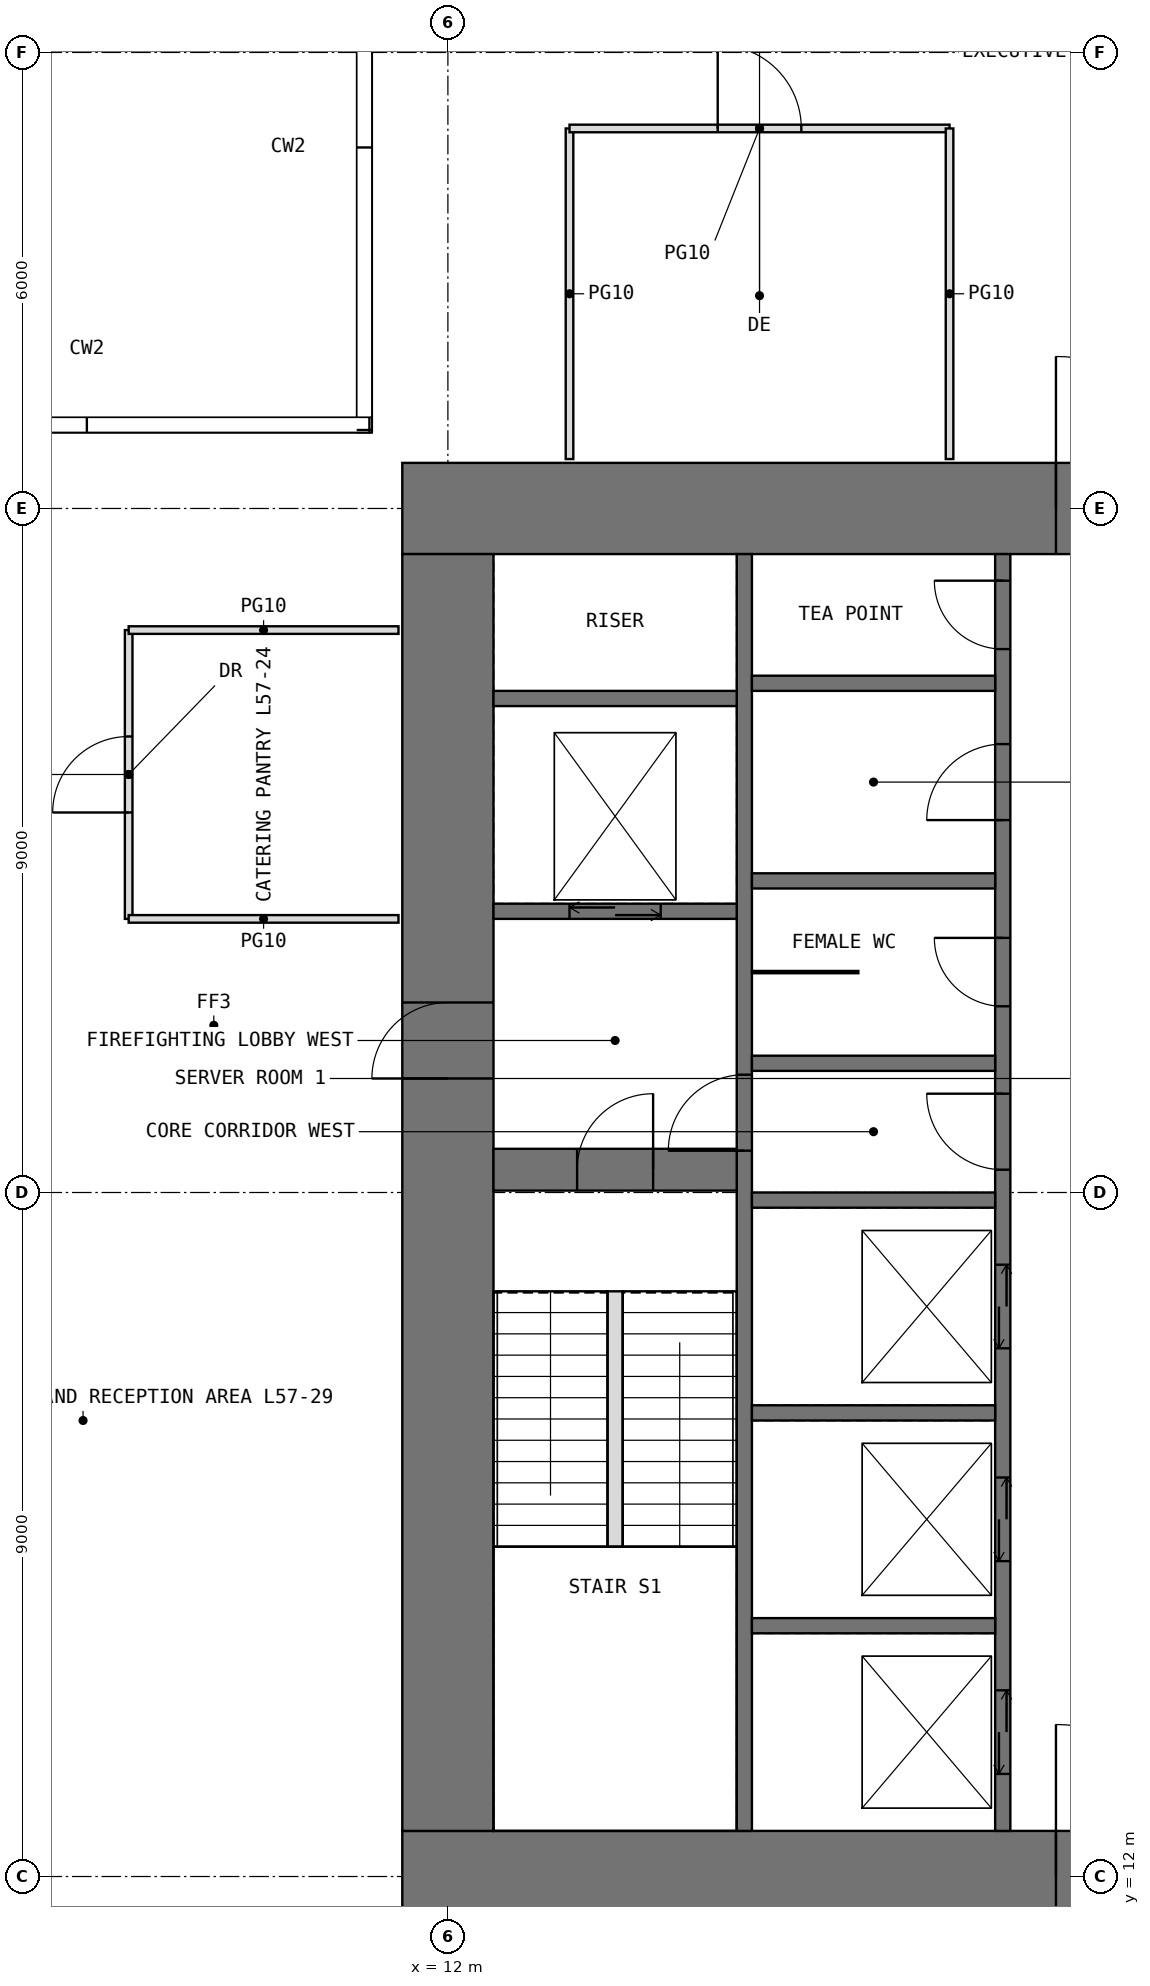
"""IFC4 building model, lengths in metres.
Left out: names, types, materials, properties, quantities, classifications, styles, units other than length and angle.
Written with IfcOpenShell. Run it as: python <this file> out.ifc"""

import sys

from ifc_helpers import new_model, si_unit, direction, frame, frame_2d, origin, place, context, subcontext, project, spatial, rectangle, extrude, element, fill, save


model = new_model("IFC4")
c1 = context("Model", 3, precision=1e-05, world=origin(), true_north=direction((0.0, 1.0)))
c2 = subcontext(c1, "Body", "Model", "MODEL_VIEW")
j1 = project(units=[si_unit("LENGTHUNIT", "METRE"), si_unit("PLANEANGLEUNIT", "RADIAN")], contexts=[c1])
p1 = place(None, origin())
s1 = spatial("IfcSite", under=j1, at=p1, CompositionType="ELEMENT")
p2 = place(p1, origin())
s2 = spatial("IfcBuilding", under=s1, at=p2, CompositionType="ELEMENT")
p3 = place(p2, frame((0.0, 0.0, 239.5)))
s3 = spatial("IfcBuildingStorey", under=s2, at=p3, CompositionType="ELEMENT", Elevation=239.5)
p4 = place(p3, frame((11.4, 12.0, -0.05), z_axis=(0.0, 0.0, 1.0), x_axis=(1.0, 0.0, 0.0)))
e1 = element("IfcWall", 1, at=p4, inside=s3, PredefinedType="SHEAR", context=c2, shape_type="SweptSolid", body=[
    extrude(rectangle(XDim=19.2, YDim=1.2, at=frame_2d((9.6, 0.0))), origin(), (0.0, 0.0, 1.0), 4.5),
])
p5 = place(p4, frame((8.6, 0.0, 0.05)))
e2 = element("IfcOpeningElement", 2, at=p5, cuts=e1, PredefinedType="OPENING", context=c2, shape_type="SweptSolid", body=[
    extrude(rectangle(XDim=2.0, YDim=2.2, at=frame_2d((1.0, 1.1))), frame((0.0, 0.61, 0.0), z_axis=(0.0, -1.0, 0.0), x_axis=(1.0, 0.0, 0.0)), (0.0, 0.0, 1.0), 1.22),
])
p6 = place(p3, frame((11.4, 30.0, -0.05), z_axis=(0.0, 0.0, 1.0), x_axis=(1.0, 0.0, 0.0)))
e3 = element("IfcWall", 3, at=p6, inside=s3, PredefinedType="SHEAR", context=c2, shape_type="SweptSolid", body=[
    extrude(rectangle(XDim=19.2, YDim=1.2, at=frame_2d((9.6, 0.0))), origin(), (0.0, 0.0, 1.0), 4.5),
])
p7 = place(p6, frame((8.6, 0.0, 0.05)))
e4 = element("IfcOpeningElement", 4, at=p7, cuts=e3, PredefinedType="OPENING", context=c2, shape_type="SweptSolid", body=[
    extrude(rectangle(XDim=2.0, YDim=2.2, at=frame_2d((1.0, 1.1))), frame((0.0, 0.61, 0.0), z_axis=(0.0, -1.0, 0.0), x_axis=(1.0, 0.0, 0.0)), (0.0, 0.0, 1.0), 1.22),
])
p8 = place(p3, frame((12.0, 12.6, -0.05), z_axis=(0.0, 0.0, 1.0), x_axis=(0.0, 1.0, 0.0)))
e5 = element("IfcWall", 5, at=p8, inside=s3, PredefinedType="SHEAR", context=c2, shape_type="SweptSolid", body=[
    extrude(rectangle(XDim=16.8, YDim=1.2, at=frame_2d((8.4, 0.0))), origin(), (0.0, 0.0, 1.0), 4.5),
])
p9 = place(p8, frame((9.9, 0.0, 0.05)))
e6 = element("IfcOpeningElement", 6, at=p9, cuts=e5, PredefinedType="OPENING", context=c2, shape_type="SweptSolid", body=[
    extrude(rectangle(XDim=1.0, YDim=2.2, at=frame_2d((0.5, 1.1))), frame((0.0, 0.61, 0.0), z_axis=(0.0, -1.0, 0.0), x_axis=(1.0, 0.0, 0.0)), (0.0, 0.0, 1.0), 1.22),
])
p10 = place(p3, frame((15.9, 12.6, -0.05), z_axis=(0.0, 0.0, 1.0), x_axis=(0.0, 1.0, 0.0)))
e7 = element("IfcWall", 7, at=p10, inside=s3, PredefinedType="SHEAR", context=c2, shape_type="SweptSolid", body=[
    extrude(rectangle(XDim=16.8, YDim=0.2, at=frame_2d((8.4, 0.0))), origin(), (0.0, 0.0, 1.0), 4.5),
])
p11 = place(p10, frame((8.95, 0.0, 0.05)))
e8 = element("IfcOpeningElement", 8, at=p11, cuts=e7, PredefinedType="OPENING", context=c2, shape_type="SweptSolid", body=[
    extrude(rectangle(XDim=1.0, YDim=2.2, at=frame_2d((0.5, 1.1))), frame((0.0, 0.11, 0.0), z_axis=(0.0, -1.0, 0.0), x_axis=(1.0, 0.0, 0.0)), (0.0, 0.0, 1.0), 0.22),
])
p12 = place(p3, frame((19.3, 12.6, -0.05), z_axis=(0.0, 0.0, 1.0), x_axis=(0.0, 1.0, 0.0)))
e9 = element("IfcWall", 9, at=p12, inside=s3, PredefinedType="SHEAR", context=c2, shape_type="SweptSolid", body=[
    extrude(rectangle(XDim=16.8, YDim=0.2, at=frame_2d((8.4, 0.0))), origin(), (0.0, 0.0, 1.0), 4.5),
])
p13 = place(p12, frame((8.7, 0.0, 0.05)))
e10 = element("IfcOpeningElement", 10, at=p13, cuts=e9, PredefinedType="OPENING", context=c2, shape_type="SweptSolid", body=[
    extrude(rectangle(XDim=1.0, YDim=2.2, at=frame_2d((0.5, 1.1))), frame((0.0, 0.11, 0.0), z_axis=(0.0, -1.0, 0.0), x_axis=(1.0, 0.0, 0.0)), (0.0, 0.0, 1.0), 0.22),
])
p14 = place(p12, frame((10.85, 0.0, 0.05)))
e11 = element("IfcOpeningElement", 11, at=p14, cuts=e9, PredefinedType="OPENING", context=c2, shape_type="SweptSolid", body=[
    extrude(rectangle(XDim=0.9, YDim=2.2, at=frame_2d((0.45, 1.1))), frame((0.0, 0.11, 0.0), z_axis=(0.0, -1.0, 0.0), x_axis=(1.0, 0.0, 0.0)), (0.0, 0.0, 1.0), 0.22),
])
p15 = place(p12, frame((13.3, 0.0, 0.05)))
e12 = element("IfcOpeningElement", 12, at=p15, cuts=e9, PredefinedType="OPENING", context=c2, shape_type="SweptSolid", body=[
    extrude(rectangle(XDim=1.0, YDim=2.2, at=frame_2d((0.5, 1.1))), frame((0.0, 0.11, 0.0), z_axis=(0.0, -1.0, 0.0), x_axis=(1.0, 0.0, 0.0)), (0.0, 0.0, 1.0), 0.22),
])
p16 = place(p12, frame((15.55, 0.0, 0.05)))
e13 = element("IfcOpeningElement", 13, at=p16, cuts=e9, PredefinedType="OPENING", context=c2, shape_type="SweptSolid", body=[
    extrude(rectangle(XDim=0.9, YDim=2.2, at=frame_2d((0.45, 1.1))), frame((0.0, 0.11, 0.0), z_axis=(0.0, -1.0, 0.0), x_axis=(1.0, 0.0, 0.0)), (0.0, 0.0, 1.0), 0.22),
])
p17 = place(p12, frame((0.75, 0.0, 0.05)))
e14 = element("IfcOpeningElement", 14, at=p17, cuts=e9, PredefinedType="OPENING", context=c2, shape_type="SweptSolid", body=[
    extrude(rectangle(XDim=1.1, YDim=2.2, at=frame_2d((0.55, 1.1))), frame((0.0, 0.11, 0.0), z_axis=(0.0, -1.0, 0.0), x_axis=(1.0, 0.0, 0.0)), (0.0, 0.0, 1.0), 0.22),
])
p18 = place(p12, frame((3.55, 0.0, 0.05)))
e15 = element("IfcOpeningElement", 15, at=p18, cuts=e9, PredefinedType="OPENING", context=c2, shape_type="SweptSolid", body=[
    extrude(rectangle(XDim=1.1, YDim=2.2, at=frame_2d((0.55, 1.1))), frame((0.0, 0.11, 0.0), z_axis=(0.0, -1.0, 0.0), x_axis=(1.0, 0.0, 0.0)), (0.0, 0.0, 1.0), 0.22),
])
p19 = place(p12, frame((6.35, 0.0, 0.05)))
e16 = element("IfcOpeningElement", 16, at=p19, cuts=e9, PredefinedType="OPENING", context=c2, shape_type="SweptSolid", body=[
    extrude(rectangle(XDim=1.1, YDim=2.2, at=frame_2d((0.55, 1.1))), frame((0.0, 0.11, 0.0), z_axis=(0.0, -1.0, 0.0), x_axis=(1.0, 0.0, 0.0)), (0.0, 0.0, 1.0), 0.22),
])
p20 = place(p3, frame((12.6, 21.3, -0.05), z_axis=(0.0, 0.0, 1.0), x_axis=(1.0, 0.0, 0.0)))
e17 = element("IfcWall", 17, at=p20, inside=s3, PredefinedType="SHEAR", context=c2, shape_type="SweptSolid", body=[
    extrude(rectangle(XDim=3.2, YDim=0.55, at=frame_2d((1.6, 0.0))), origin(), (0.0, 0.0, 1.0), 4.5),
])
p21 = place(p20, frame((1.1, 0.0, 0.05)))
e18 = element("IfcOpeningElement", 18, at=p21, cuts=e17, PredefinedType="OPENING", context=c2, shape_type="SweptSolid", body=[
    extrude(rectangle(XDim=1.0, YDim=2.2, at=frame_2d((0.5, 1.1))), frame((0.0, 0.285, 0.0), z_axis=(0.0, -1.0, 0.0), x_axis=(1.0, 0.0, 0.0)), (0.0, 0.0, 1.0), 0.57),
])
p22 = place(p3, frame((12.6, 24.7, -0.05), z_axis=(0.0, 0.0, 1.0), x_axis=(1.0, 0.0, 0.0)))
e19 = element("IfcWall", 19, at=p22, inside=s3, PredefinedType="SHEAR", context=c2, shape_type="SweptSolid", body=[
    extrude(rectangle(XDim=3.2, YDim=0.2, at=frame_2d((1.6, 0.0))), origin(), (0.0, 0.0, 1.0), 4.5),
])
p23 = place(p22, frame((1.0, 0.0, 0.05)))
e20 = element("IfcOpeningElement", 20, at=p23, cuts=e19, PredefinedType="OPENING", context=c2, shape_type="SweptSolid", body=[
    extrude(rectangle(XDim=1.2, YDim=2.2, at=frame_2d((0.6, 1.1))), frame((0.0, 0.11, 0.0), z_axis=(0.0, -1.0, 0.0), x_axis=(1.0, 0.0, 0.0)), (0.0, 0.0, 1.0), 0.22),
])
for number, where, z_axis, x_axis in (
    (21, (12.6, 27.5, -0.05), (0.0, 0.0, 1.0), (1.0, 0.0, 0.0)),
    (22, (16.0, 15.3, -0.05), (0.0, 0.0, 1.0), (1.0, 0.0, 0.0)),
    (23, (16.0, 18.1, -0.05), (0.0, 0.0, 1.0), (1.0, 0.0, 0.0)),
    (24, (16.0, 20.9, -0.05), (0.0, 0.0, 1.0), (1.0, 0.0, 0.0)),
    (25, (16.0, 22.7, -0.05), (0.0, 0.0, 1.0), (1.0, 0.0, 0.0)),
    (26, (16.0, 25.1, -0.05), (0.0, 0.0, 1.0), (1.0, 0.0, 0.0)),
    (27, (16.0, 27.7, -0.05), (0.0, 0.0, 1.0), (1.0, 0.0, 0.0)),
):
    element("IfcWall", number, at=place(p3, frame(where, z_axis=z_axis, x_axis=x_axis)), inside=s3, PredefinedType="SHEAR", context=c2, shape_type="SweptSolid", body=[
        extrude(rectangle(XDim=3.2, YDim=0.2, at=frame_2d((1.6, 0.0))), origin(), (0.0, 0.0, 1.0), 4.5),
    ])
p24 = place(p3, frame((16.0, 23.9, 0.0), z_axis=(0.0, 0.0, 1.0), x_axis=(1.0, 0.0, 0.0)))
e28 = element("IfcWall", 28, at=p24, inside=s3, PredefinedType="PARTITIONING", context=c2, shape_type="SweptSolid", body=[
    extrude(rectangle(XDim=1.4, YDim=0.03, at=frame_2d((0.7, 0.0))), origin(), (0.0, 0.0, 1.0), 4.25),
])
p25 = place(p3, frame((7.8, 24.6, 0.0), z_axis=(0.0, 0.0, 1.0), x_axis=(0.0, 1.0, 0.0)))
e29 = element("IfcWall", 29, at=p25, inside=s3, PredefinedType="PARTITIONING", context=c2, shape_type="SweptSolid", body=[
    extrude(rectangle(XDim=3.8, YDim=0.1, at=frame_2d((1.9, 0.0))), origin(), (0.0, 0.0, 1.0), 4.25),
])
p26 = place(p25, frame((1.4, 0.0, 0.0)))
e30 = element("IfcOpeningElement", 30, at=p26, cuts=e29, PredefinedType="OPENING", context=c2, shape_type="SweptSolid", body=[
    extrude(rectangle(XDim=1.0, YDim=2.2, at=frame_2d((0.5, 1.1))), frame((0.0, 0.06, 0.0), z_axis=(0.0, -1.0, 0.0), x_axis=(1.0, 0.0, 0.0)), (0.0, 0.0, 1.0), 0.12),
])
for number, where, z_axis, x_axis in (
    (31, (7.8, 24.6, 0.0), (0.0, 0.0, 1.0), (1.0, 0.0, 0.0)),
    (32, (7.8, 28.4, 0.0), (0.0, 0.0, 1.0), (1.0, 0.0, 0.0)),
):
    element("IfcWall", number, at=place(p3, frame(where, z_axis=z_axis, x_axis=x_axis)), inside=s3, PredefinedType="PARTITIONING", context=c2, shape_type="SweptSolid", body=[
        extrude(rectangle(XDim=3.55, YDim=0.1, at=frame_2d((1.775, 0.0))), origin(), (0.0, 0.0, 1.0), 4.25),
    ])
p27 = place(p3, frame((13.6, 30.65, 0.0), z_axis=(0.0, 0.0, 1.0), x_axis=(0.0, 1.0, 0.0)))
e33 = element("IfcWall", 33, at=p27, inside=s3, PredefinedType="PARTITIONING", context=c2, shape_type="SweptSolid", body=[
    extrude(rectangle(XDim=4.35, YDim=0.1, at=frame_2d((2.175, 0.0))), origin(), (0.0, 0.0, 1.0), 4.25),
])
p28 = place(p3, frame((13.6, 35.0, 0.0), z_axis=(0.0, 0.0, 1.0), x_axis=(1.0, 0.0, 0.0)))
e34 = element("IfcWall", 34, at=p28, inside=s3, PredefinedType="PARTITIONING", context=c2, shape_type="SweptSolid", body=[
    extrude(rectangle(XDim=5.0, YDim=0.1, at=frame_2d((2.5, 0.0))), origin(), (0.0, 0.0, 1.0), 4.25),
])
p29 = place(p28, frame((1.95, 0.0, 0.0)))
e35 = element("IfcOpeningElement", 35, at=p29, cuts=e34, PredefinedType="OPENING", context=c2, shape_type="SweptSolid", body=[
    extrude(rectangle(XDim=1.1, YDim=2.3, at=frame_2d((0.55, 1.15))), frame((0.0, 0.06, 0.0), z_axis=(0.0, -1.0, 0.0), x_axis=(1.0, 0.0, 0.0)), (0.0, 0.0, 1.0), 0.12),
])
p30 = place(p3, frame((18.6, 30.65, 0.0), z_axis=(0.0, 0.0, 1.0), x_axis=(0.0, 1.0, 0.0)))
e36 = element("IfcWall", 36, at=p30, inside=s3, PredefinedType="PARTITIONING", context=c2, shape_type="SweptSolid", body=[
    extrude(rectangle(XDim=4.35, YDim=0.1, at=frame_2d((2.175, 0.0))), origin(), (0.0, 0.0, 1.0), 4.25),
])
p31 = place(p3, frame((14.2, 16.34, 0.0), z_axis=(0.0, 0.0, 1.0), x_axis=(0.0, 1.0, 0.0)))
e37 = element("IfcWall", 37, at=p31, inside=s3, PredefinedType="PARTITIONING", context=c2, shape_type="SweptSolid", body=[
    extrude(rectangle(XDim=3.36, YDim=0.2, at=frame_2d((1.68, 0.0))), origin(), (0.0, 0.0, 1.0), 4.5),
])
p32 = place(p5, origin())
e38 = element("IfcDoor", 38, at=p32, inside=s3, OperationType="DOUBLE_DOOR_SINGLE_SWING", PredefinedType="DOOR", context=c2, shape_type="SweptSolid", body=[
    extrude(rectangle(XDim=2.0, YDim=2.2, at=frame_2d((1.0, 1.1))), frame((0.0, 0.025, 0.0), z_axis=(0.0, -1.0, 0.0), x_axis=(1.0, 0.0, 0.0)), (0.0, 0.0, 1.0), 0.05),
])
fill(e2, e38)
p33 = place(p7, origin())
e39 = element("IfcDoor", 39, at=p33, inside=s3, OperationType="DOUBLE_DOOR_SINGLE_SWING", PredefinedType="DOOR", context=c2, shape_type="SweptSolid", body=[
    extrude(rectangle(XDim=2.0, YDim=2.2, at=frame_2d((1.0, 1.1))), frame((0.0, 0.025, 0.0), z_axis=(0.0, -1.0, 0.0), x_axis=(1.0, 0.0, 0.0)), (0.0, 0.0, 1.0), 0.05),
])
fill(e4, e39)
p34 = place(p9, origin())
e40 = element("IfcDoor", 40, at=p34, inside=s3, OperationType="SINGLE_SWING_LEFT", PredefinedType="DOOR", context=c2, shape_type="SweptSolid", body=[
    extrude(rectangle(XDim=1.0, YDim=2.2, at=frame_2d((0.5, 1.1))), frame((0.0, 0.025, 0.0), z_axis=(0.0, -1.0, 0.0), x_axis=(1.0, 0.0, 0.0)), (0.0, 0.0, 1.0), 0.05),
])
fill(e6, e40)
p35 = place(p21, origin())
e41 = element("IfcDoor", 41, at=p35, inside=s3, OperationType="SINGLE_SWING_RIGHT", PredefinedType="DOOR", context=c2, shape_type="SweptSolid", body=[
    extrude(rectangle(XDim=1.0, YDim=2.2, at=frame_2d((0.5, 1.1))), frame((0.0, 0.025, 0.0), z_axis=(0.0, -1.0, 0.0), x_axis=(1.0, 0.0, 0.0)), (0.0, 0.0, 1.0), 0.05),
])
fill(e18, e41)
p36 = place(p11, origin())
e42 = element("IfcDoor", 42, at=p36, inside=s3, OperationType="SINGLE_SWING_LEFT", PredefinedType="DOOR", context=c2, shape_type="SweptSolid", body=[
    extrude(rectangle(XDim=1.0, YDim=2.2, at=frame_2d((0.5, 1.1))), frame((0.0, 0.025, 0.0), z_axis=(0.0, -1.0, 0.0), x_axis=(1.0, 0.0, 0.0)), (0.0, 0.0, 1.0), 0.05),
])
fill(e8, e42)
p37 = place(p13, origin())
e43 = element("IfcDoor", 43, at=p37, inside=s3, OperationType="SINGLE_SWING_RIGHT", PredefinedType="DOOR", context=c2, shape_type="SweptSolid", body=[
    extrude(rectangle(XDim=1.0, YDim=2.2, at=frame_2d((0.5, 1.1))), frame((0.0, 0.025, 0.0), z_axis=(0.0, -1.0, 0.0), x_axis=(1.0, 0.0, 0.0)), (0.0, 0.0, 1.0), 0.05),
])
fill(e10, e43)
p38 = place(p14, origin())
e44 = element("IfcDoor", 44, at=p38, inside=s3, OperationType="SINGLE_SWING_RIGHT", PredefinedType="DOOR", context=c2, shape_type="SweptSolid", body=[
    extrude(rectangle(XDim=0.9, YDim=2.2, at=frame_2d((0.45, 1.1))), frame((0.0, 0.025, 0.0), z_axis=(0.0, -1.0, 0.0), x_axis=(1.0, 0.0, 0.0)), (0.0, 0.0, 1.0), 0.05),
])
fill(e11, e44)
p39 = place(p15, origin())
e45 = element("IfcDoor", 45, at=p39, inside=s3, OperationType="SINGLE_SWING_LEFT", PredefinedType="DOOR", context=c2, shape_type="SweptSolid", body=[
    extrude(rectangle(XDim=1.0, YDim=2.2, at=frame_2d((0.5, 1.1))), frame((0.0, 0.025, 0.0), z_axis=(0.0, -1.0, 0.0), x_axis=(1.0, 0.0, 0.0)), (0.0, 0.0, 1.0), 0.05),
])
fill(e12, e45)
p40 = place(p16, origin())
e46 = element("IfcDoor", 46, at=p40, inside=s3, OperationType="SINGLE_SWING_RIGHT", PredefinedType="DOOR", context=c2, shape_type="SweptSolid", body=[
    extrude(rectangle(XDim=0.9, YDim=2.2, at=frame_2d((0.45, 1.1))), frame((0.0, 0.025, 0.0), z_axis=(0.0, -1.0, 0.0), x_axis=(1.0, 0.0, 0.0)), (0.0, 0.0, 1.0), 0.05),
])
fill(e13, e46)
p41 = place(p29, origin())
e47 = element("IfcDoor", 47, at=p41, inside=s3, OperationType="SINGLE_SWING_LEFT", PredefinedType="DOOR", context=c2, shape_type="SweptSolid", body=[
    extrude(rectangle(XDim=1.1, YDim=2.3, at=frame_2d((0.55, 1.15))), frame((0.0, 0.025, 0.0), z_axis=(0.0, -1.0, 0.0), x_axis=(1.0, 0.0, 0.0)), (0.0, 0.0, 1.0), 0.05),
])
fill(e35, e47)
p42 = place(p26, origin())
e48 = element("IfcDoor", 48, at=p42, inside=s3, OperationType="SINGLE_SWING_LEFT", PredefinedType="DOOR", context=c2, shape_type="SweptSolid", body=[
    extrude(rectangle(XDim=1.0, YDim=2.2, at=frame_2d((0.5, 1.1))), frame((0.0, 0.025, 0.0), z_axis=(0.0, -1.0, 0.0), x_axis=(1.0, 0.0, 0.0)), (0.0, 0.0, 1.0), 0.05),
])
fill(e30, e48)
p43 = place(p17, origin())
e49 = element("IfcDoor", 49, at=p43, inside=s3, OperationType="DOUBLE_DOOR_SLIDING", PredefinedType="DOOR", context=c2, shape_type="SweptSolid", body=[
    extrude(rectangle(XDim=1.1, YDim=2.2, at=frame_2d((0.55, 1.1))), frame((0.0, 0.025, 0.0), z_axis=(0.0, -1.0, 0.0), x_axis=(1.0, 0.0, 0.0)), (0.0, 0.0, 1.0), 0.05),
])
fill(e14, e49)
p44 = place(p18, origin())
e50 = element("IfcDoor", 50, at=p44, inside=s3, OperationType="DOUBLE_DOOR_SLIDING", PredefinedType="DOOR", context=c2, shape_type="SweptSolid", body=[
    extrude(rectangle(XDim=1.1, YDim=2.2, at=frame_2d((0.55, 1.1))), frame((0.0, 0.025, 0.0), z_axis=(0.0, -1.0, 0.0), x_axis=(1.0, 0.0, 0.0)), (0.0, 0.0, 1.0), 0.05),
])
fill(e15, e50)
p45 = place(p19, origin())
e51 = element("IfcDoor", 51, at=p45, inside=s3, OperationType="DOUBLE_DOOR_SLIDING", PredefinedType="DOOR", context=c2, shape_type="SweptSolid", body=[
    extrude(rectangle(XDim=1.1, YDim=2.2, at=frame_2d((0.55, 1.1))), frame((0.0, 0.025, 0.0), z_axis=(0.0, -1.0, 0.0), x_axis=(1.0, 0.0, 0.0)), (0.0, 0.0, 1.0), 0.05),
])
fill(e16, e51)
p46 = place(p23, origin())
e52 = element("IfcDoor", 52, at=p46, inside=s3, OperationType="DOUBLE_DOOR_SLIDING", PredefinedType="DOOR", context=c2, shape_type="SweptSolid", body=[
    extrude(rectangle(XDim=1.2, YDim=2.2, at=frame_2d((0.6, 1.1))), frame((0.0, 0.025, 0.0), z_axis=(0.0, -1.0, 0.0), x_axis=(1.0, 0.0, 0.0)), (0.0, 0.0, 1.0), 0.05),
])
fill(e20, e52)
save(model, sys.argv[1])
